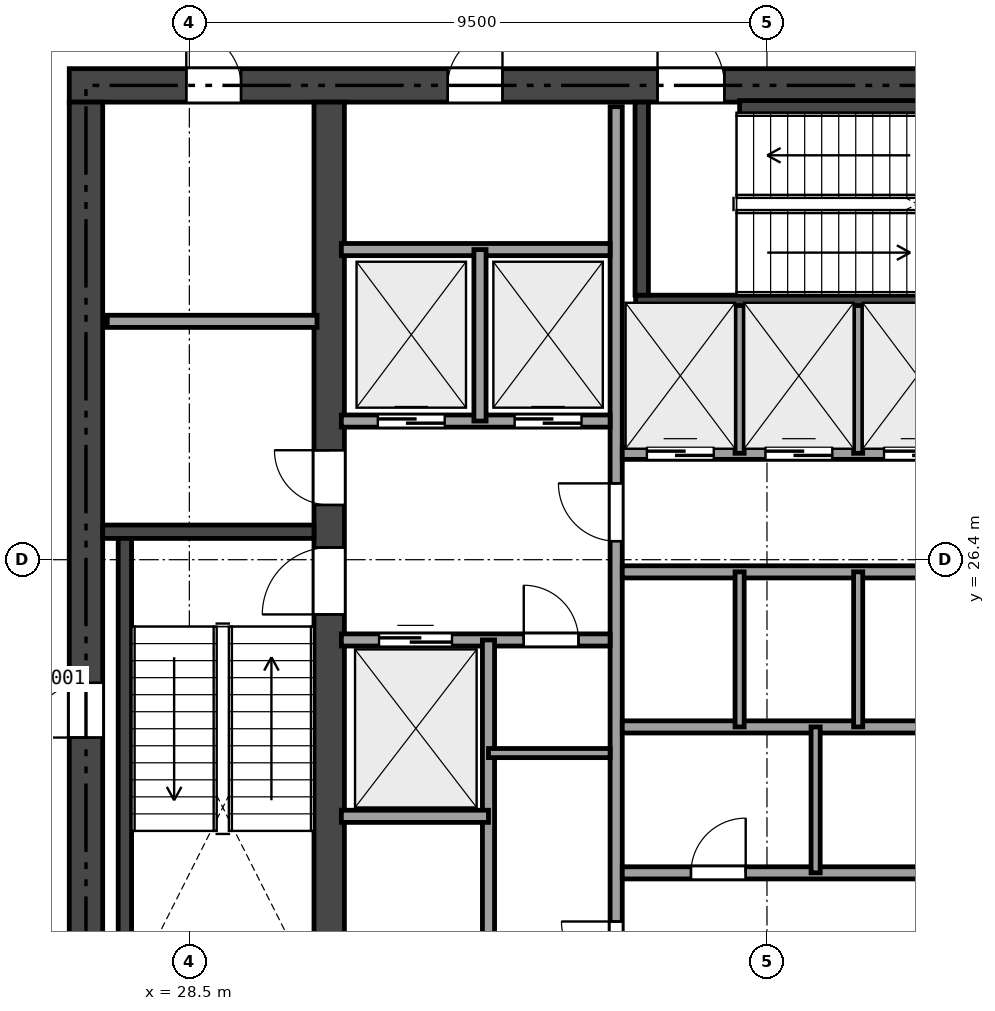
"""IFC4 building model, lengths in metres.
Left out: names, types, materials, properties, quantities, classifications, styles, units other than length and angle.
Written with IfcOpenShell. Run it as: python <this file> out.ifc"""

import sys

from ifc_helpers import new_model, si_unit, direction, frame, frame_2d, origin, place, context, subcontext, project, spatial, rectangle, extrude, element, fill, save


model = new_model("IFC4")
c1 = context("Model", 3, precision=1e-05, world=origin(), true_north=direction((0.0, 1.0)))
c2 = subcontext(c1, "Body", "Model", "MODEL_VIEW")
j1 = project(units=[si_unit("LENGTHUNIT", "METRE"), si_unit("PLANEANGLEUNIT", "RADIAN")], contexts=[c1])
p1 = place(None, origin())
s1 = spatial("IfcSite", under=j1, at=p1, CompositionType="ELEMENT")
p2 = place(p1, origin())
s2 = spatial("IfcBuilding", under=s1, at=p2, CompositionType="ELEMENT")
p3 = place(p2, frame((0.0, 0.0, 223.8)))
s3 = spatial("IfcBuildingStorey", under=s2, at=p3, CompositionType="ELEMENT", Elevation=223.8)
p4 = place(p3, frame((26.525, 34.2, 0.0), z_axis=(0.0, 0.0, 1.0), x_axis=(1.0, 0.0, 0.0)))
e1 = element("IfcWall", 1, at=p4, inside=s3, PredefinedType="SHEAR", context=c2, shape_type="SweptSolid", body=[
    extrude(rectangle(XDim=21.35, YDim=0.55, at=frame_2d((10.675, 0.0))), origin(), (0.0, 0.0, 1.0), 4.14),
])
p5 = place(p4, frame((9.675, 0.0, 0.0)))
e2 = element("IfcOpeningElement", 2, at=p5, cuts=e1, PredefinedType="OPENING", context=c2, shape_type="SweptSolid", body=[
    extrude(rectangle(XDim=1.1, YDim=2.15, at=frame_2d((0.55, 1.075))), frame((0.0, 0.285, 0.0), z_axis=(0.0, -1.0, 0.0), x_axis=(1.0, 0.0, 0.0)), (0.0, 0.0, 1.0), 0.57),
])
p6 = place(p4, frame((1.925, 0.0, 0.0)))
e3 = element("IfcOpeningElement", 3, at=p6, cuts=e1, PredefinedType="OPENING", context=c2, shape_type="SweptSolid", body=[
    extrude(rectangle(XDim=0.9, YDim=2.1, at=frame_2d((0.45, 1.05))), frame((0.0, 0.285, 0.0), z_axis=(0.0, -1.0, 0.0), x_axis=(1.0, 0.0, 0.0)), (0.0, 0.0, 1.0), 0.57),
])
p7 = place(p4, frame((6.225, 0.0, 0.0)))
e4 = element("IfcOpeningElement", 4, at=p7, cuts=e1, PredefinedType="OPENING", context=c2, shape_type="SweptSolid", body=[
    extrude(rectangle(XDim=0.9, YDim=2.1, at=frame_2d((0.45, 1.05))), frame((0.0, 0.285, 0.0), z_axis=(0.0, -1.0, 0.0), x_axis=(1.0, 0.0, 0.0)), (0.0, 0.0, 1.0), 0.57),
])
p8 = place(p3, frame((26.8, 18.875, 0.0), z_axis=(0.0, 0.0, 1.0), x_axis=(0.0, 1.0, 0.0)))
e5 = element("IfcWall", 5, at=p8, inside=s3, PredefinedType="SHEAR", context=c2, shape_type="SweptSolid", body=[
    extrude(rectangle(XDim=15.05, YDim=0.55, at=frame_2d((7.525, 0.0))), origin(), (0.0, 0.0, 1.0), 4.14),
])
p9 = place(p8, frame((4.6, 0.0, 0.02)))
e6 = element("IfcOpeningElement", 6, at=p9, cuts=e5, PredefinedType="OPENING", context=c2, shape_type="SweptSolid", body=[
    extrude(rectangle(XDim=0.9, YDim=2.02, at=frame_2d((0.45, 1.01))), frame((0.0, 0.285, 0.0), z_axis=(0.0, -1.0, 0.0), x_axis=(1.0, 0.0, 0.0)), (0.0, 0.0, 1.0), 0.57),
])
p10 = place(p3, frame((30.8, 18.875, 0.0), z_axis=(0.0, 0.0, 1.0), x_axis=(0.0, 1.0, 0.0)))
e7 = element("IfcWall", 7, at=p10, inside=s3, PredefinedType="SHEAR", context=c2, shape_type="SweptSolid", body=[
    extrude(rectangle(XDim=15.05, YDim=0.5, at=frame_2d((7.525, 0.0))), origin(), (0.0, 0.0, 1.0), 4.14),
])
p11 = place(p10, frame((6.625, 0.0, 0.0)))
e8 = element("IfcOpeningElement", 8, at=p11, cuts=e7, PredefinedType="OPENING", context=c2, shape_type="SweptSolid", body=[
    extrude(rectangle(XDim=1.1, YDim=2.15, at=frame_2d((0.55, 1.075))), frame((0.0, 0.26, 0.0), z_axis=(0.0, -1.0, 0.0), x_axis=(1.0, 0.0, 0.0)), (0.0, 0.0, 1.0), 0.52),
])
p12 = place(p10, frame((8.425, 0.0, 0.0)))
e9 = element("IfcOpeningElement", 9, at=p12, cuts=e7, PredefinedType="OPENING", context=c2, shape_type="SweptSolid", body=[
    extrude(rectangle(XDim=0.9, YDim=2.1, at=frame_2d((0.45, 1.05))), frame((0.0, 0.26, 0.0), z_axis=(0.0, -1.0, 0.0), x_axis=(1.0, 0.0, 0.0)), (0.0, 0.0, 1.0), 0.52),
])
p13 = place(p3, frame((27.075, 26.86, 0.0), z_axis=(0.0, 0.0, 1.0), x_axis=(1.0, 0.0, 0.0)))
e10 = element("IfcWall", 10, at=p13, inside=s3, PredefinedType="SHEAR", context=c2, shape_type="SweptSolid", body=[
    extrude(rectangle(XDim=3.475, YDim=0.22, at=frame_2d((1.738, 0.0))), origin(), (0.0, 0.0, 1.0), 4.14),
])
p14 = place(p3, frame((27.44, 19.35, 0.0), z_axis=(0.0, 0.0, 1.0), x_axis=(0.0, 1.0, 0.0)))
e11 = element("IfcWall", 11, at=p14, inside=s3, PredefinedType="SHEAR", context=c2, shape_type="SweptSolid", body=[
    extrude(rectangle(XDim=7.4, YDim=0.22, at=frame_2d((3.7, 0.0))), origin(), (0.0, 0.0, 1.0), 4.14),
])
p15 = place(p3, frame((35.84, 30.64, 0.0), z_axis=(0.0, 0.0, 1.0), x_axis=(1.0, 0.0, 0.0)))
e12 = element("IfcWall", 12, at=p15, inside=s3, PredefinedType="SHEAR", context=c2, shape_type="SweptSolid", body=[
    extrude(rectangle(XDim=7.61, YDim=0.22, at=frame_2d((3.805, 0.0))), origin(), (0.0, 0.0, 1.0), 4.14),
])
p16 = place(p3, frame((35.94, 30.75, 0.0), z_axis=(0.0, 0.0, 1.0), x_axis=(0.0, 1.0, 0.0)))
e13 = element("IfcWall", 13, at=p16, inside=s3, PredefinedType="SHEAR", context=c2, shape_type="SweptSolid", body=[
    extrude(rectangle(XDim=3.175, YDim=0.22, at=frame_2d((1.587, 0.0))), origin(), (0.0, 0.0, 1.0), 4.14),
])
p17 = place(p3, frame((37.55, 33.84, 0.0), z_axis=(0.0, 0.0, 1.0), x_axis=(1.0, 0.0, 0.0)))
e14 = element("IfcWall", 14, at=p17, inside=s3, PredefinedType="SHEAR", context=c2, shape_type="SweptSolid", body=[
    extrude(rectangle(XDim=5.9, YDim=0.22, at=frame_2d((2.95, 0.0))), origin(), (0.0, 0.0, 1.0), 4.14),
])
p18 = place(p3, frame((27.15, 30.32, 0.0), z_axis=(0.0, 0.0, 1.0), x_axis=(1.0, 0.0, 0.0)))
e15 = element("IfcWall", 15, at=p18, inside=s3, PredefinedType="SOLIDWALL", context=c2, shape_type="SweptSolid", body=[
    extrude(rectangle(XDim=3.45, YDim=0.2, at=frame_2d((1.725, 0.0))), origin(), (0.0, 0.0, 1.0), 4.14),
])
p19 = place(p3, frame((35.52, 18.95, 0.0), z_axis=(0.0, 0.0, 1.0), x_axis=(0.0, 1.0, 0.0)))
e16 = element("IfcWall", 16, at=p19, inside=s3, PredefinedType="SOLIDWALL", context=c2, shape_type="SweptSolid", body=[
    extrude(rectangle(XDim=14.9, YDim=0.2, at=frame_2d((7.45, 0.0))), origin(), (0.0, 0.0, 1.0), 3.661),
])
p20 = place(p19, frame((7.755, 0.0, 0.0)))
e17 = element("IfcOpeningElement", 17, at=p20, cuts=e16, PredefinedType="OPENING", context=c2, shape_type="SweptSolid", body=[
    extrude(rectangle(XDim=0.95, YDim=2.15, at=frame_2d((0.475, 1.075))), frame((0.0, 0.11, 0.0), z_axis=(0.0, -1.0, 0.0), x_axis=(1.0, 0.0, 0.0)), (0.0, 0.0, 1.0), 0.22),
])
p21 = place(p19, frame((0.6, 0.0, 0.0)))
e18 = element("IfcOpeningElement", 18, at=p21, cuts=e16, PredefinedType="OPENING", context=c2, shape_type="SweptSolid", body=[
    extrude(rectangle(XDim=0.9, YDim=2.1, at=frame_2d((0.45, 1.05))), frame((0.0, 0.11, 0.0), z_axis=(0.0, -1.0, 0.0), x_axis=(1.0, 0.0, 0.0)), (0.0, 0.0, 1.0), 0.22),
])
p22 = place(p3, frame((31.0, 28.68, 0.0), z_axis=(0.0, 0.0, 1.0), x_axis=(1.0, 0.0, 0.0)))
e19 = element("IfcWall", 19, at=p22, inside=s3, PredefinedType="SOLIDWALL", context=c2, shape_type="SweptSolid", body=[
    extrude(rectangle(XDim=4.42, YDim=0.2, at=frame_2d((2.21, 0.0))), origin(), (0.0, 0.0, 1.0), 4.14),
])
p23 = place(p22, frame((0.6, 0.0, 0.0)))
e20 = element("IfcOpeningElement", 20, at=p23, cuts=e19, PredefinedType="OPENING", context=c2, shape_type="SweptSolid", body=[
    extrude(rectangle(XDim=1.1, YDim=2.15, at=frame_2d((0.55, 1.075))), frame((0.0, 0.11, 0.0), z_axis=(0.0, -1.0, 0.0), x_axis=(1.0, 0.0, 0.0)), (0.0, 0.0, 1.0), 0.22),
])
p24 = place(p22, frame((2.85, 0.0, 0.0)))
e21 = element("IfcOpeningElement", 21, at=p24, cuts=e19, PredefinedType="OPENING", context=c2, shape_type="SweptSolid", body=[
    extrude(rectangle(XDim=1.1, YDim=2.15, at=frame_2d((0.55, 1.075))), frame((0.0, 0.11, 0.0), z_axis=(0.0, -1.0, 0.0), x_axis=(1.0, 0.0, 0.0)), (0.0, 0.0, 1.0), 0.22),
])
p25 = place(p3, frame((31.0, 31.5, 0.0), z_axis=(0.0, 0.0, 1.0), x_axis=(1.0, 0.0, 0.0)))
e22 = element("IfcWall", 22, at=p25, inside=s3, PredefinedType="SOLIDWALL", context=c2, shape_type="SweptSolid", body=[
    extrude(rectangle(XDim=4.42, YDim=0.2, at=frame_2d((2.21, 0.0))), origin(), (0.0, 0.0, 1.0), 4.14),
])
p26 = place(p3, frame((33.28, 28.68, 0.0), z_axis=(0.0, 0.0, 1.0), x_axis=(0.0, 1.0, 0.0)))
e23 = element("IfcWall", 23, at=p26, inside=s3, PredefinedType="SOLIDWALL", context=c2, shape_type="SweptSolid", body=[
    extrude(rectangle(XDim=2.82, YDim=0.2, at=frame_2d((1.41, 0.0))), origin(), (0.0, 0.0, 1.0), 4.14),
])
p27 = place(p3, frame((31.0, 25.08, 0.0), z_axis=(0.0, 0.0, 1.0), x_axis=(1.0, 0.0, 0.0)))
e24 = element("IfcWall", 24, at=p27, inside=s3, PredefinedType="SOLIDWALL", context=c2, shape_type="SweptSolid", body=[
    extrude(rectangle(XDim=4.42, YDim=0.2, at=frame_2d((2.21, 0.0))), origin(), (0.0, 0.0, 1.0), 4.14),
])
p28 = place(p27, frame((3.0, 0.0, 0.0)))
e25 = element("IfcOpeningElement", 25, at=p28, cuts=e24, PredefinedType="OPENING", context=c2, shape_type="SweptSolid", body=[
    extrude(rectangle(XDim=0.9, YDim=2.1, at=frame_2d((0.45, 1.05))), frame((0.0, 0.11, 0.0), z_axis=(0.0, -1.0, 0.0), x_axis=(1.0, 0.0, 0.0)), (0.0, 0.0, 1.0), 0.22),
])
p29 = place(p27, frame((0.62, 0.0, 0.0)))
e26 = element("IfcOpeningElement", 26, at=p29, cuts=e24, PredefinedType="OPENING", context=c2, shape_type="SweptSolid", body=[
    extrude(rectangle(XDim=1.2, YDim=2.15, at=frame_2d((0.6, 1.075))), frame((0.0, 0.11, 0.0), z_axis=(0.0, -1.0, 0.0), x_axis=(1.0, 0.0, 0.0)), (0.0, 0.0, 1.0), 0.22),
])
p30 = place(p3, frame((33.42, 18.95, 0.0), z_axis=(0.0, 0.0, 1.0), x_axis=(0.0, 1.0, 0.0)))
e27 = element("IfcWall", 27, at=p30, inside=s3, PredefinedType="SOLIDWALL", context=c2, shape_type="SweptSolid", body=[
    extrude(rectangle(XDim=6.13, YDim=0.2, at=frame_2d((3.065, 0.0))), origin(), (0.0, 0.0, 1.0), 3.661),
])
p31 = place(p3, frame((31.0, 22.18, 0.0), z_axis=(0.0, 0.0, 1.0), x_axis=(1.0, 0.0, 0.0)))
e28 = element("IfcWall", 28, at=p31, inside=s3, PredefinedType="SOLIDWALL", context=c2, shape_type="SweptSolid", body=[
    extrude(rectangle(XDim=2.42, YDim=0.2, at=frame_2d((1.21, 0.0))), origin(), (0.0, 0.0, 1.0), 4.14),
])
p32 = place(p3, frame((33.42, 23.22, 0.0), z_axis=(0.0, 0.0, 1.0), x_axis=(1.0, 0.0, 0.0)))
e29 = element("IfcWall", 29, at=p32, inside=s3, PredefinedType="PARTITIONING", context=c2, shape_type="SweptSolid", body=[
    extrude(rectangle(XDim=2.0, YDim=0.15, at=frame_2d((1.0, 0.0))), origin(), (0.0, 0.0, 1.0), 4.14),
])
p33 = place(p3, frame((35.62, 28.15, 0.0), z_axis=(0.0, 0.0, 1.0), x_axis=(1.0, 0.0, 0.0)))
e30 = element("IfcWall", 30, at=p33, inside=s3, PredefinedType="SOLIDWALL", context=c2, shape_type="SweptSolid", body=[
    extrude(rectangle(XDim=7.88, YDim=0.2, at=frame_2d((3.94, 0.0))), origin(), (0.0, 0.0, 1.0), 4.14),
])
p34 = place(p33, frame((0.405, 0.0, 0.0)))
e31 = element("IfcOpeningElement", 31, at=p34, cuts=e30, PredefinedType="OPENING", context=c2, shape_type="SweptSolid", body=[
    extrude(rectangle(XDim=1.1, YDim=2.15, at=frame_2d((0.55, 1.075))), frame((0.0, 0.11, 0.0), z_axis=(0.0, -1.0, 0.0), x_axis=(1.0, 0.0, 0.0)), (0.0, 0.0, 1.0), 0.22),
])
p35 = place(p33, frame((2.355, 0.0, 0.0)))
e32 = element("IfcOpeningElement", 32, at=p35, cuts=e30, PredefinedType="OPENING", context=c2, shape_type="SweptSolid", body=[
    extrude(rectangle(XDim=1.1, YDim=2.15, at=frame_2d((0.55, 1.075))), frame((0.0, 0.11, 0.0), z_axis=(0.0, -1.0, 0.0), x_axis=(1.0, 0.0, 0.0)), (0.0, 0.0, 1.0), 0.22),
])
p36 = place(p33, frame((4.305, 0.0, 0.0)))
e33 = element("IfcOpeningElement", 33, at=p36, cuts=e30, PredefinedType="OPENING", context=c2, shape_type="SweptSolid", body=[
    extrude(rectangle(XDim=1.1, YDim=2.15, at=frame_2d((0.55, 1.075))), frame((0.0, 0.11, 0.0), z_axis=(0.0, -1.0, 0.0), x_axis=(1.0, 0.0, 0.0)), (0.0, 0.0, 1.0), 0.22),
])
p37 = place(p33, frame((6.255, 0.0, 0.0)))
e34 = element("IfcOpeningElement", 34, at=p37, cuts=e30, PredefinedType="OPENING", context=c2, shape_type="SweptSolid", body=[
    extrude(rectangle(XDim=1.1, YDim=2.15, at=frame_2d((0.55, 1.075))), frame((0.0, 0.11, 0.0), z_axis=(0.0, -1.0, 0.0), x_axis=(1.0, 0.0, 0.0)), (0.0, 0.0, 1.0), 0.22),
])
p38 = place(p3, frame((35.62, 26.2, 0.0), z_axis=(0.0, 0.0, 1.0), x_axis=(1.0, 0.0, 0.0)))
e35 = element("IfcWall", 35, at=p38, inside=s3, PredefinedType="SOLIDWALL", context=c2, shape_type="SweptSolid", body=[
    extrude(rectangle(XDim=7.88, YDim=0.2, at=frame_2d((3.94, 0.0))), origin(), (0.0, 0.0, 1.0), 4.14),
])
p39 = place(p3, frame((35.62, 23.65, 0.0), z_axis=(0.0, 0.0, 1.0), x_axis=(1.0, 0.0, 0.0)))
e36 = element("IfcWall", 36, at=p39, inside=s3, PredefinedType="SOLIDWALL", context=c2, shape_type="SweptSolid", body=[
    extrude(rectangle(XDim=7.88, YDim=0.2, at=frame_2d((3.94, 0.0))), origin(), (0.0, 0.0, 1.0), 3.661),
])
p40 = place(p3, frame((35.62, 21.25, 0.0), z_axis=(0.0, 0.0, 1.0), x_axis=(1.0, 0.0, 0.0)))
e37 = element("IfcWall", 37, at=p40, inside=s3, PredefinedType="SOLIDWALL", context=c2, shape_type="SweptSolid", body=[
    extrude(rectangle(XDim=7.88, YDim=0.2, at=frame_2d((3.94, 0.0))), origin(), (0.0, 0.0, 1.0), 4.14),
])
p41 = place(p40, frame((1.13, 0.0, 0.0)))
e38 = element("IfcOpeningElement", 38, at=p41, cuts=e37, PredefinedType="OPENING", context=c2, shape_type="SweptSolid", body=[
    extrude(rectangle(XDim=0.9, YDim=2.1, at=frame_2d((0.45, 1.05))), frame((0.0, 0.11, 0.0), z_axis=(0.0, -1.0, 0.0), x_axis=(1.0, 0.0, 0.0)), (0.0, 0.0, 1.0), 0.22),
])
p42 = place(p40, frame((5.73, 0.0, 0.0)))
e39 = element("IfcOpeningElement", 39, at=p42, cuts=e37, PredefinedType="OPENING", context=c2, shape_type="SweptSolid", body=[
    extrude(rectangle(XDim=0.9, YDim=2.1, at=frame_2d((0.45, 1.05))), frame((0.0, 0.11, 0.0), z_axis=(0.0, -1.0, 0.0), x_axis=(1.0, 0.0, 0.0)), (0.0, 0.0, 1.0), 0.22),
])
for number, where, z_axis, x_axis in (
    (40, (37.55, 28.15, 0.0), (0.0, 0.0, 1.0), (0.0, 1.0, 0.0)),
    (41, (39.5, 28.15, 0.0), (0.0, 0.0, 1.0), (0.0, 1.0, 0.0)),
):
    element("IfcWall", number, at=place(p3, frame(where, z_axis=z_axis, x_axis=x_axis)), inside=s3, PredefinedType="PARTITIONING", context=c2, shape_type="SweptSolid", body=[
        extrude(rectangle(XDim=2.43, YDim=0.15, at=frame_2d((1.215, 0.0))), origin(), (0.0, 0.0, 1.0), 4.14),
    ])
for number, where, z_axis, x_axis in (
    (42, (37.55, 23.65, 0.0), (0.0, 0.0, 1.0), (0.0, 1.0, 0.0)),
    (43, (39.5, 23.65, 0.0), (0.0, 0.0, 1.0), (0.0, 1.0, 0.0)),
):
    element("IfcWall", number, at=place(p3, frame(where, z_axis=z_axis, x_axis=x_axis)), inside=s3, PredefinedType="PARTITIONING", context=c2, shape_type="SweptSolid", body=[
        extrude(rectangle(XDim=2.55, YDim=0.15, at=frame_2d((1.275, 0.0))), origin(), (0.0, 0.0, 1.0), 3.661),
    ])
p43 = place(p3, frame((38.8, 21.25, 0.0), z_axis=(0.0, 0.0, 1.0), x_axis=(0.0, 1.0, 0.0)))
e44 = element("IfcWall", 44, at=p43, inside=s3, PredefinedType="PARTITIONING", context=c2, shape_type="SweptSolid", body=[
    extrude(rectangle(XDim=2.4, YDim=0.15, at=frame_2d((1.2, 0.0))), origin(), (0.0, 0.0, 1.0), 3.661),
])
p44 = place(p9, origin())
e45 = element("IfcDoor", 45, at=p44, inside=s3, OperationType="SINGLE_SWING_LEFT", PredefinedType="TRAPDOOR", context=c2, shape_type="SweptSolid", body=[
    extrude(rectangle(XDim=0.9, YDim=2.02, at=frame_2d((0.45, 1.01))), frame((0.0, 0.025, 0.0), z_axis=(0.0, -1.0, 0.0), x_axis=(1.0, 0.0, 0.0)), (0.0, 0.0, 1.0), 0.05),
])
fill(e6, e45)
p45 = place(p11, origin())
e46 = element("IfcDoor", 46, at=p45, inside=s3, OperationType="SINGLE_SWING_LEFT", PredefinedType="DOOR", context=c2, shape_type="SweptSolid", body=[
    extrude(rectangle(XDim=1.1, YDim=2.15, at=frame_2d((0.55, 1.075))), frame((0.0, 0.025, 0.0), z_axis=(0.0, -1.0, 0.0), x_axis=(1.0, 0.0, 0.0)), (0.0, 0.0, 1.0), 0.05),
])
fill(e8, e46)
p46 = place(p5, origin())
e47 = element("IfcDoor", 47, at=p46, inside=s3, OperationType="SINGLE_SWING_LEFT", PredefinedType="DOOR", context=c2, shape_type="SweptSolid", body=[
    extrude(rectangle(XDim=1.1, YDim=2.15, at=frame_2d((0.55, 1.075))), frame((0.0, 0.025, 0.0), z_axis=(0.0, -1.0, 0.0), x_axis=(1.0, 0.0, 0.0)), (0.0, 0.0, 1.0), 0.05),
])
fill(e2, e47)
p47 = place(p20, origin())
e48 = element("IfcDoor", 48, at=p47, inside=s3, OperationType="SINGLE_SWING_RIGHT", PredefinedType="DOOR", context=c2, shape_type="SweptSolid", body=[
    extrude(rectangle(XDim=0.95, YDim=2.15, at=frame_2d((0.475, 1.075))), frame((0.0, 0.025, 0.0), z_axis=(0.0, -1.0, 0.0), x_axis=(1.0, 0.0, 0.0)), (0.0, 0.0, 1.0), 0.05),
])
fill(e17, e48)
p48 = place(p12, origin())
e49 = element("IfcDoor", 49, at=p48, inside=s3, OperationType="SINGLE_SWING_RIGHT", PredefinedType="DOOR", context=c2, shape_type="SweptSolid", body=[
    extrude(rectangle(XDim=0.9, YDim=2.1, at=frame_2d((0.45, 1.05))), frame((0.0, 0.025, 0.0), z_axis=(0.0, -1.0, 0.0), x_axis=(1.0, 0.0, 0.0)), (0.0, 0.0, 1.0), 0.05),
])
fill(e9, e49)
p49 = place(p6, origin())
e50 = element("IfcDoor", 50, at=p49, inside=s3, OperationType="SINGLE_SWING_LEFT", PredefinedType="DOOR", context=c2, shape_type="SweptSolid", body=[
    extrude(rectangle(XDim=0.9, YDim=2.1, at=frame_2d((0.45, 1.05))), frame((0.0, 0.025, 0.0), z_axis=(0.0, -1.0, 0.0), x_axis=(1.0, 0.0, 0.0)), (0.0, 0.0, 1.0), 0.05),
])
fill(e3, e50)
p50 = place(p7, origin())
e51 = element("IfcDoor", 51, at=p50, inside=s3, OperationType="SINGLE_SWING_RIGHT", PredefinedType="DOOR", context=c2, shape_type="SweptSolid", body=[
    extrude(rectangle(XDim=0.9, YDim=2.1, at=frame_2d((0.45, 1.05))), frame((0.0, 0.025, 0.0), z_axis=(0.0, -1.0, 0.0), x_axis=(1.0, 0.0, 0.0)), (0.0, 0.0, 1.0), 0.05),
])
fill(e4, e51)
p51 = place(p21, origin())
e52 = element("IfcDoor", 52, at=p51, inside=s3, OperationType="SINGLE_SWING_RIGHT", PredefinedType="DOOR", context=c2, shape_type="SweptSolid", body=[
    extrude(rectangle(XDim=0.9, YDim=2.1, at=frame_2d((0.45, 1.05))), frame((0.0, 0.025, 0.0), z_axis=(0.0, -1.0, 0.0), x_axis=(1.0, 0.0, 0.0)), (0.0, 0.0, 1.0), 0.05),
])
fill(e18, e52)
p52 = place(p28, origin())
e53 = element("IfcDoor", 53, at=p52, inside=s3, OperationType="SINGLE_SWING_LEFT", PredefinedType="DOOR", context=c2, shape_type="SweptSolid", body=[
    extrude(rectangle(XDim=0.9, YDim=2.1, at=frame_2d((0.45, 1.05))), frame((0.0, 0.025, 0.0), z_axis=(0.0, -1.0, 0.0), x_axis=(1.0, 0.0, 0.0)), (0.0, 0.0, 1.0), 0.05),
])
fill(e25, e53)
p53 = place(p41, origin())
e54 = element("IfcDoor", 54, at=p53, inside=s3, OperationType="SINGLE_SWING_RIGHT", PredefinedType="DOOR", context=c2, shape_type="SweptSolid", body=[
    extrude(rectangle(XDim=0.9, YDim=2.1, at=frame_2d((0.45, 1.05))), frame((0.0, 0.025, 0.0), z_axis=(0.0, -1.0, 0.0), x_axis=(1.0, 0.0, 0.0)), (0.0, 0.0, 1.0), 0.05),
])
fill(e38, e54)
p54 = place(p23, origin())
e55 = element("IfcDoor", 55, at=p54, inside=s3, OperationType="SLIDING_TO_LEFT", PredefinedType="DOOR", context=c2, shape_type="SweptSolid", body=[
    extrude(rectangle(XDim=1.1, YDim=2.15, at=frame_2d((0.55, 1.075))), frame((0.0, 0.025, 0.0), z_axis=(0.0, -1.0, 0.0), x_axis=(1.0, 0.0, 0.0)), (0.0, 0.0, 1.0), 0.05),
])
fill(e20, e55)
p55 = place(p24, origin())
e56 = element("IfcDoor", 56, at=p55, inside=s3, OperationType="SLIDING_TO_LEFT", PredefinedType="DOOR", context=c2, shape_type="SweptSolid", body=[
    extrude(rectangle(XDim=1.1, YDim=2.15, at=frame_2d((0.55, 1.075))), frame((0.0, 0.025, 0.0), z_axis=(0.0, -1.0, 0.0), x_axis=(1.0, 0.0, 0.0)), (0.0, 0.0, 1.0), 0.05),
])
fill(e21, e56)
p56 = place(p29, origin())
e57 = element("IfcDoor", 57, at=p56, inside=s3, OperationType="SLIDING_TO_LEFT", PredefinedType="DOOR", context=c2, shape_type="SweptSolid", body=[
    extrude(rectangle(XDim=1.2, YDim=2.15, at=frame_2d((0.6, 1.075))), frame((0.0, 0.025, 0.0), z_axis=(0.0, -1.0, 0.0), x_axis=(1.0, 0.0, 0.0)), (0.0, 0.0, 1.0), 0.05),
])
fill(e26, e57)
p57 = place(p34, origin())
e58 = element("IfcDoor", 58, at=p57, inside=s3, OperationType="SLIDING_TO_LEFT", PredefinedType="DOOR", context=c2, shape_type="SweptSolid", body=[
    extrude(rectangle(XDim=1.1, YDim=2.15, at=frame_2d((0.55, 1.075))), frame((0.0, 0.025, 0.0), z_axis=(0.0, -1.0, 0.0), x_axis=(1.0, 0.0, 0.0)), (0.0, 0.0, 1.0), 0.05),
])
fill(e31, e58)
p58 = place(p35, origin())
e59 = element("IfcDoor", 59, at=p58, inside=s3, OperationType="SLIDING_TO_LEFT", PredefinedType="DOOR", context=c2, shape_type="SweptSolid", body=[
    extrude(rectangle(XDim=1.1, YDim=2.15, at=frame_2d((0.55, 1.075))), frame((0.0, 0.025, 0.0), z_axis=(0.0, -1.0, 0.0), x_axis=(1.0, 0.0, 0.0)), (0.0, 0.0, 1.0), 0.05),
])
fill(e32, e59)
p59 = place(p36, origin())
e60 = element("IfcDoor", 60, at=p59, inside=s3, OperationType="SLIDING_TO_LEFT", PredefinedType="DOOR", context=c2, shape_type="SweptSolid", body=[
    extrude(rectangle(XDim=1.1, YDim=2.15, at=frame_2d((0.55, 1.075))), frame((0.0, 0.025, 0.0), z_axis=(0.0, -1.0, 0.0), x_axis=(1.0, 0.0, 0.0)), (0.0, 0.0, 1.0), 0.05),
])
fill(e33, e60)
save(model, sys.argv[1])
